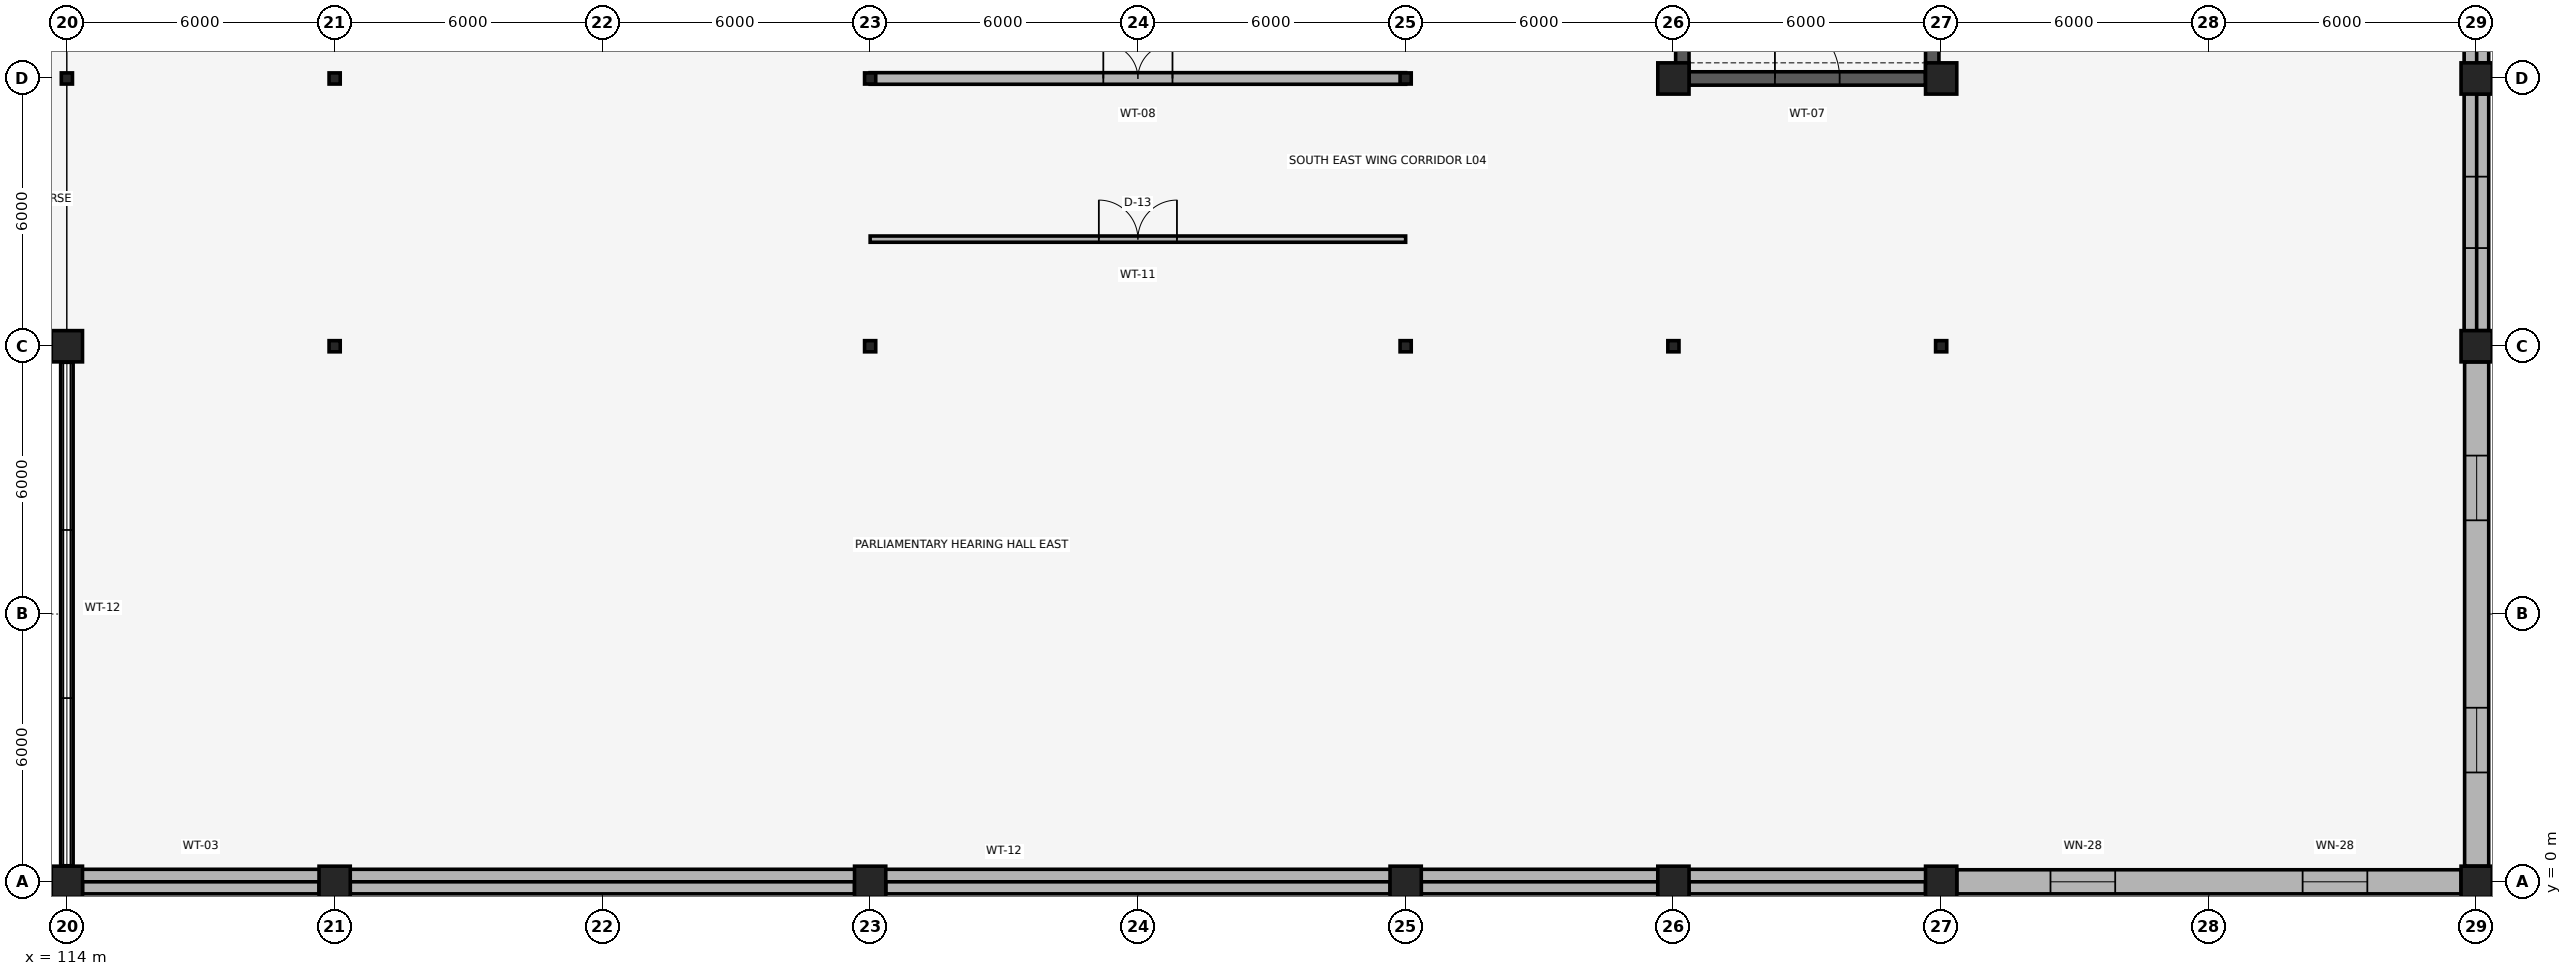
"""IFC4 building model, lengths in metres.
Left out: names, types, materials, properties, quantities, classifications, styles, units other than length and angle.
Written with IfcOpenShell. Run it as: python <this file> out.ifc"""

import sys

from ifc_helpers import new_model, si_unit, direction, frame, frame_2d, origin, origin_2d, place, context, subcontext, project, spatial, rectangle, i_section, extrude, element, fill, save


model = new_model("IFC4")
c1 = context("Model", 3, precision=1e-05, world=origin(), true_north=direction((0.0, 1.0)))
c2 = subcontext(c1, "Body", "Model", "MODEL_VIEW")
j1 = project(units=[si_unit("LENGTHUNIT", "METRE"), si_unit("PLANEANGLEUNIT", "RADIAN")], contexts=[c1])
p1 = place(None, origin())
s1 = spatial("IfcSite", under=j1, at=p1, CompositionType="ELEMENT")
p2 = place(p1, origin())
s2 = spatial("IfcBuilding", under=s1, at=p2, CompositionType="ELEMENT")
p3 = place(p2, frame((0.0, 0.0, 16.5)))
s3 = spatial("IfcBuildingStorey", under=s2, at=p3, CompositionType="ELEMENT", Elevation=16.5)
for number, where, z_axis, x_axis in (
    (1, (114.0, 0.0, 0.0), (0.0, 0.0, 1.0), (1.0, 0.0, 0.0)),
    (2, (120.0, 0.0, 0.0), (0.0, 0.0, 1.0), (1.0, 0.0, 0.0)),
    (3, (132.0, 0.0, 0.0), (0.0, 0.0, 1.0), (1.0, 0.0, 0.0)),
    (4, (144.0, 0.0, 0.0), (0.0, 0.0, 1.0), (1.0, 0.0, 0.0)),
    (5, (150.0, 0.0, 0.0), (0.0, 0.0, 1.0), (1.0, 0.0, 0.0)),
    (6, (156.0, 0.0, 0.0), (0.0, 0.0, 1.0), (1.0, 0.0, 0.0)),
    (7, (168.0, 0.0, 0.0), (0.0, 0.0, 1.0), (1.0, 0.0, 0.0)),
    (8, (114.0, 12.0, 0.0), (0.0, 0.0, 1.0), (1.0, 0.0, 0.0)),
):
    element("IfcColumn", number, at=place(p3, frame(where, z_axis=z_axis, x_axis=x_axis)), inside=s3, PredefinedType="COLUMN", context=c2, shape_type="SweptSolid", body=[
        extrude(rectangle(XDim=0.7, YDim=0.7, at=origin_2d()), origin(), (0.0, 0.0, 1.0), 4.0),
    ])
for number, where, z_axis, x_axis in (
    (9, (120.0, 12.0, 0.0), (0.0, 0.0, 1.0), (1.0, 0.0, 0.0)),
    (10, (132.0, 12.0, 0.0), (0.0, 0.0, 1.0), (1.0, 0.0, 0.0)),
    (11, (144.0, 12.0, 0.0), (0.0, 0.0, 1.0), (1.0, 0.0, 0.0)),
    (12, (150.0, 12.0, 0.0), (0.0, 0.0, 1.0), (1.0, 0.0, 0.0)),
    (13, (156.0, 12.0, 0.0), (0.0, 0.0, 1.0), (1.0, 0.0, 0.0)),
):
    element("IfcColumn", number, at=place(p3, frame(where, z_axis=z_axis, x_axis=x_axis)), inside=s3, PredefinedType="COLUMN", context=c2, shape_type="SweptSolid", body=[
        extrude(i_section(OverallWidth=0.25, OverallDepth=0.25, WebThickness=0.009, FlangeThickness=0.014, FilletRadius=0.016, at=origin_2d()), origin(), (0.0, 0.0, 1.0), 4.0),
    ])
p4 = place(p3, frame((168.0, 12.0, 0.0), z_axis=(0.0, 0.0, 1.0), x_axis=(1.0, 0.0, 0.0)))
e14 = element("IfcColumn", 14, at=p4, inside=s3, PredefinedType="COLUMN", context=c2, shape_type="SweptSolid", body=[
    extrude(rectangle(XDim=0.7, YDim=0.7, at=origin_2d()), origin(), (0.0, 0.0, 1.0), 4.0),
])
for number, where, z_axis, x_axis in (
    (15, (114.0, 18.0, 0.0), (0.0, 0.0, 1.0), (1.0, 0.0, 0.0)),
    (16, (120.0, 18.0, 0.0), (0.0, 0.0, 1.0), (1.0, 0.0, 0.0)),
    (17, (132.0, 18.0, 0.0), (0.0, 0.0, 1.0), (1.0, 0.0, 0.0)),
    (18, (144.0, 18.0, 0.0), (0.0, 0.0, 1.0), (1.0, 0.0, 0.0)),
):
    element("IfcColumn", number, at=place(p3, frame(where, z_axis=z_axis, x_axis=x_axis)), inside=s3, PredefinedType="COLUMN", context=c2, shape_type="SweptSolid", body=[
        extrude(i_section(OverallWidth=0.25, OverallDepth=0.25, WebThickness=0.009, FlangeThickness=0.014, FilletRadius=0.016, at=origin_2d()), origin(), (0.0, 0.0, 1.0), 4.0),
    ])
for number, where, z_axis, x_axis in (
    (19, (150.0, 18.0, 0.0), (0.0, 0.0, 1.0), (1.0, 0.0, 0.0)),
    (20, (156.0, 18.0, 0.0), (0.0, 0.0, 1.0), (1.0, 0.0, 0.0)),
    (21, (168.0, 18.0, 0.0), (0.0, 0.0, 1.0), (1.0, 0.0, 0.0)),
):
    element("IfcColumn", number, at=place(p3, frame(where, z_axis=z_axis, x_axis=x_axis)), inside=s3, PredefinedType="COLUMN", context=c2, shape_type="SweptSolid", body=[
        extrude(rectangle(XDim=0.7, YDim=0.7, at=origin_2d()), origin(), (0.0, 0.0, 1.0), 4.0),
    ])
p5 = place(p3, frame((114.35, 0.0, 0.0), z_axis=(0.0, 0.0, 1.0), x_axis=(1.0, 0.0, 0.0)))
e22 = element("IfcWall", 22, at=p5, inside=s3, PredefinedType="SOLIDWALL", context=c2, shape_type="SweptSolid", body=[
    extrude(rectangle(XDim=5.3, YDim=0.54, at=frame_2d((2.65, 0.0))), origin(), (0.0, 0.0, 1.0), 3.55),
])
for number, where, z_axis, x_axis in (
    (23, (120.35, 0.0, 0.0), (0.0, 0.0, 1.0), (1.0, 0.0, 0.0)),
    (24, (132.35, 0.0, 0.0), (0.0, 0.0, 1.0), (1.0, 0.0, 0.0)),
):
    element("IfcWall", number, at=place(p3, frame(where, z_axis=z_axis, x_axis=x_axis)), inside=s3, PredefinedType="SOLIDWALL", context=c2, shape_type="SweptSolid", body=[
        extrude(rectangle(XDim=11.3, YDim=0.54, at=frame_2d((5.65, 0.0))), origin(), (0.0, 0.0, 1.0), 3.55),
    ])
for number, where, z_axis, x_axis in (
    (25, (144.35, 0.0, 0.0), (0.0, 0.0, 1.0), (1.0, 0.0, 0.0)),
    (26, (150.35, 0.0, 0.0), (0.0, 0.0, 1.0), (1.0, 0.0, 0.0)),
):
    element("IfcWall", number, at=place(p3, frame(where, z_axis=z_axis, x_axis=x_axis)), inside=s3, PredefinedType="SOLIDWALL", context=c2, shape_type="SweptSolid", body=[
        extrude(rectangle(XDim=5.3, YDim=0.54, at=frame_2d((2.65, 0.0))), origin(), (0.0, 0.0, 1.0), 3.55),
    ])
p6 = place(p3, frame((156.35, 0.0, 0.0), z_axis=(0.0, 0.0, 1.0), x_axis=(1.0, 0.0, 0.0)))
e27 = element("IfcWall", 27, at=p6, inside=s3, PredefinedType="SOLIDWALL", context=c2, shape_type="SweptSolid", body=[
    extrude(rectangle(XDim=11.3, YDim=0.54, at=frame_2d((5.65, 0.0))), origin(), (0.0, 0.0, 1.0), 3.55),
])
p7 = place(p6, frame((2.1, 0.0, 0.85)))
e28 = element("IfcOpeningElement", 28, at=p7, cuts=e27, PredefinedType="OPENING", context=c2, shape_type="SweptSolid", body=[
    extrude(rectangle(XDim=1.45, YDim=2.15, at=frame_2d((0.725, 1.075))), frame((0.0, 0.285, 0.0), z_axis=(0.0, -1.0, 0.0), x_axis=(1.0, 0.0, 0.0)), (0.0, 0.0, 1.0), 0.57),
])
p8 = place(p6, frame((7.75, 0.0, 0.85)))
e29 = element("IfcOpeningElement", 29, at=p8, cuts=e27, PredefinedType="OPENING", context=c2, shape_type="SweptSolid", body=[
    extrude(rectangle(XDim=1.45, YDim=2.15, at=frame_2d((0.725, 1.075))), frame((0.0, 0.285, 0.0), z_axis=(0.0, -1.0, 0.0), x_axis=(1.0, 0.0, 0.0)), (0.0, 0.0, 1.0), 0.57),
])
p9 = place(p3, frame((168.0, 0.35, 0.0), z_axis=(0.0, 0.0, 1.0), x_axis=(0.0, 1.0, 0.0)))
e30 = element("IfcWall", 30, at=p9, inside=s3, PredefinedType="SOLIDWALL", context=c2, shape_type="SweptSolid", body=[
    extrude(rectangle(XDim=11.3, YDim=0.54, at=frame_2d((5.65, 0.0))), origin(), (0.0, 0.0, 1.0), 3.55),
])
p10 = place(p9, frame((2.1, 0.0, 0.85)))
e31 = element("IfcOpeningElement", 31, at=p10, cuts=e30, PredefinedType="OPENING", context=c2, shape_type="SweptSolid", body=[
    extrude(rectangle(XDim=1.45, YDim=2.15, at=frame_2d((0.725, 1.075))), frame((0.0, 0.285, 0.0), z_axis=(0.0, -1.0, 0.0), x_axis=(1.0, 0.0, 0.0)), (0.0, 0.0, 1.0), 0.57),
])
p11 = place(p9, frame((7.75, 0.0, 0.85)))
e32 = element("IfcOpeningElement", 32, at=p11, cuts=e30, PredefinedType="OPENING", context=c2, shape_type="SweptSolid", body=[
    extrude(rectangle(XDim=1.45, YDim=2.15, at=frame_2d((0.725, 1.075))), frame((0.0, 0.285, 0.0), z_axis=(0.0, -1.0, 0.0), x_axis=(1.0, 0.0, 0.0)), (0.0, 0.0, 1.0), 0.57),
])
p12 = place(p3, frame((168.0, 12.35, 0.0), z_axis=(0.0, 0.0, 1.0), x_axis=(0.0, 1.0, 0.0)))
e33 = element("IfcWall", 33, at=p12, inside=s3, PredefinedType="SOLIDWALL", context=c2, shape_type="SweptSolid", body=[
    extrude(rectangle(XDim=5.3, YDim=0.54, at=frame_2d((2.65, 0.0))), origin(), (0.0, 0.0, 1.0), 3.55),
])
p13 = place(p12, frame((1.85, 0.0, 0.85)))
e34 = element("IfcOpeningElement", 34, at=p13, cuts=e33, PredefinedType="OPENING", context=c2, shape_type="SweptSolid", body=[
    extrude(rectangle(XDim=1.6, YDim=2.2, at=frame_2d((0.8, 1.1))), frame((0.0, 0.285, 0.0), z_axis=(0.0, -1.0, 0.0), x_axis=(1.0, 0.0, 0.0)), (0.0, 0.0, 1.0), 0.57),
])
p14 = place(p3, frame((168.0, 18.35, 0.0), z_axis=(0.0, 0.0, 1.0), x_axis=(0.0, 1.0, 0.0)))
e35 = element("IfcWall", 35, at=p14, inside=s3, PredefinedType="SOLIDWALL", context=c2, shape_type="SweptSolid", body=[
    extrude(rectangle(XDim=11.3, YDim=0.54, at=frame_2d((5.65, 0.0))), origin(), (0.0, 0.0, 1.0), 3.55),
])
p15 = place(p14, frame((2.025, 0.0, 0.85)))
e36 = element("IfcOpeningElement", 36, at=p15, cuts=e35, PredefinedType="OPENING", context=c2, shape_type="SweptSolid", body=[
    extrude(rectangle(XDim=1.6, YDim=2.2, at=frame_2d((0.8, 1.1))), frame((0.0, 0.285, 0.0), z_axis=(0.0, -1.0, 0.0), x_axis=(1.0, 0.0, 0.0)), (0.0, 0.0, 1.0), 0.57),
])
p16 = place(p14, frame((7.675, 0.0, 0.85)))
e37 = element("IfcOpeningElement", 37, at=p16, cuts=e35, PredefinedType="OPENING", context=c2, shape_type="SweptSolid", body=[
    extrude(rectangle(XDim=1.6, YDim=2.2, at=frame_2d((0.8, 1.1))), frame((0.0, 0.285, 0.0), z_axis=(0.0, -1.0, 0.0), x_axis=(1.0, 0.0, 0.0)), (0.0, 0.0, 1.0), 0.57),
])
p17 = place(p3, frame((54.0, 12.14, 4.2), z_axis=(0.0, 0.0, 1.0), x_axis=(1.0, 0.0, 0.0)))
e38 = element("IfcWall", 38, at=p17, inside=s3, PredefinedType="PARAPET", context=c2, shape_type="SweptSolid", body=[
    extrude(rectangle(XDim=60.0, YDim=0.28, at=frame_2d((30.0, 0.0))), origin(), (0.0, 0.0, 1.0), 0.85),
])
p18 = place(p3, frame((114.0, 0.0, 4.2), z_axis=(0.0, 0.0, 1.0), x_axis=(0.0, 1.0, 0.0)))
e39 = element("IfcWall", 39, at=p18, inside=s3, PredefinedType="PARAPET", context=c2, shape_type="SweptSolid", body=[
    extrude(rectangle(XDim=12.28, YDim=0.28, at=frame_2d((6.14, 0.0))), origin(), (0.0, 0.0, 1.0), 0.85),
])
p19 = place(p3, frame((114.0, 0.14, 4.2), z_axis=(0.0, 0.0, 1.0), x_axis=(1.0, 0.0, 0.0)))
e40 = element("IfcWall", 40, at=p19, inside=s3, PredefinedType="PARAPET", context=c2, shape_type="SweptSolid", body=[
    extrude(rectangle(XDim=42.0, YDim=0.28, at=frame_2d((21.0, 0.0))), origin(), (0.0, 0.0, 1.0), 0.85),
])
p20 = place(p3, frame((167.86, 12.0, 4.2), z_axis=(0.0, 0.0, 1.0), x_axis=(0.0, 1.0, 0.0)))
e41 = element("IfcWall", 41, at=p20, inside=s3, PredefinedType="PARAPET", context=c2, shape_type="SweptSolid", body=[
    extrude(rectangle(XDim=90.0, YDim=0.28, at=frame_2d((45.0, 0.0))), origin(), (0.0, 0.0, 1.0), 0.85),
])
p21 = place(p3, frame((150.35, 18.0, 0.0), z_axis=(0.0, 0.0, 1.0), x_axis=(1.0, 0.0, 0.0)))
e42 = element("IfcWall", 42, at=p21, inside=s3, PredefinedType="SHEAR", context=c2, shape_type="SweptSolid", body=[
    extrude(rectangle(XDim=5.3, YDim=0.3, at=frame_2d((2.65, 0.0))), origin(), (0.0, 0.0, 1.0), 4.0),
])
p22 = place(p21, frame((1.925, 0.0, 0.0)))
e43 = element("IfcOpeningElement", 43, at=p22, cuts=e42, PredefinedType="OPENING", context=c2, shape_type="SweptSolid", body=[
    extrude(rectangle(XDim=1.45, YDim=2.25, at=frame_2d((0.725, 1.125))), frame((0.0, 0.165, 0.0), z_axis=(0.0, -1.0, 0.0), x_axis=(1.0, 0.0, 0.0)), (0.0, 0.0, 1.0), 0.33),
])
for number, where, z_axis, x_axis in (
    (44, (150.2, 18.0, 0.0), (0.0, 0.0, 1.0), (0.0, 1.0, 0.0)),
    (45, (155.8, 18.0, 0.0), (0.0, 0.0, 1.0), (0.0, 1.0, 0.0)),
):
    element("IfcWall", number, at=place(p3, frame(where, z_axis=z_axis, x_axis=x_axis)), inside=s3, PredefinedType="SHEAR", context=c2, shape_type="SweptSolid", body=[
        extrude(rectangle(XDim=11.8, YDim=0.3, at=frame_2d((5.9, 0.0))), origin(), (0.0, 0.0, 1.0), 4.0),
    ])
p23 = place(p3, frame((132.0, 14.4, 0.0), z_axis=(0.0, 0.0, 1.0), x_axis=(1.0, 0.0, 0.0)))
e46 = element("IfcWall", 46, at=p23, inside=s3, PredefinedType="PARTITIONING", context=c2, shape_type="SweptSolid", body=[
    extrude(rectangle(XDim=12.0, YDim=0.14, at=frame_2d((6.0, 0.0))), origin(), (0.0, 0.0, 1.0), 4.0),
])
p24 = place(p23, frame((5.125, 0.0, 0.0)))
e47 = element("IfcOpeningElement", 47, at=p24, cuts=e46, PredefinedType="OPENING", context=c2, shape_type="SweptSolid", body=[
    extrude(rectangle(XDim=1.75, YDim=2.55, at=frame_2d((0.875, 1.275))), frame((0.0, 0.085, 0.0), z_axis=(0.0, -1.0, 0.0), x_axis=(1.0, 0.0, 0.0)), (0.0, 0.0, 1.0), 0.17),
])
p25 = place(p3, frame((132.0, 18.0, 0.0), z_axis=(0.0, 0.0, 1.0), x_axis=(1.0, 0.0, 0.0)))
e48 = element("IfcWall", 48, at=p25, inside=s3, PredefinedType="PARTITIONING", context=c2, shape_type="SweptSolid", body=[
    extrude(rectangle(XDim=12.0, YDim=0.26, at=frame_2d((6.0, 0.0))), origin(), (0.0, 0.0, 1.0), 3.513),
])
p26 = place(p25, frame((5.225, 0.0, 0.0)))
e49 = element("IfcOpeningElement", 49, at=p26, cuts=e48, PredefinedType="OPENING", context=c2, shape_type="SweptSolid", body=[
    extrude(rectangle(XDim=1.55, YDim=2.3, at=frame_2d((0.775, 1.15))), frame((0.0, 0.145, 0.0), z_axis=(0.0, -1.0, 0.0), x_axis=(1.0, 0.0, 0.0)), (0.0, 0.0, 1.0), 0.29),
])
p27 = place(p7, origin())
e50 = element("IfcWindow", 50, at=p27, inside=s3, PartitioningType="SINGLE_PANEL", PredefinedType="WINDOW", context=c2, shape_type="SweptSolid", body=[
    extrude(rectangle(XDim=1.45, YDim=2.15, at=frame_2d((0.725, 1.075))), frame((0.0, 0.03, 0.0), z_axis=(0.0, -1.0, 0.0), x_axis=(1.0, 0.0, 0.0)), (0.0, 0.0, 1.0), 0.06),
])
fill(e28, e50)
p28 = place(p8, origin())
e51 = element("IfcWindow", 51, at=p28, inside=s3, PartitioningType="SINGLE_PANEL", PredefinedType="WINDOW", context=c2, shape_type="SweptSolid", body=[
    extrude(rectangle(XDim=1.45, YDim=2.15, at=frame_2d((0.725, 1.075))), frame((0.0, 0.03, 0.0), z_axis=(0.0, -1.0, 0.0), x_axis=(1.0, 0.0, 0.0)), (0.0, 0.0, 1.0), 0.06),
])
fill(e29, e51)
p29 = place(p10, origin())
e52 = element("IfcWindow", 52, at=p29, inside=s3, PartitioningType="SINGLE_PANEL", PredefinedType="WINDOW", context=c2, shape_type="SweptSolid", body=[
    extrude(rectangle(XDim=1.45, YDim=2.15, at=frame_2d((0.725, 1.075))), frame((0.0, 0.03, 0.0), z_axis=(0.0, -1.0, 0.0), x_axis=(1.0, 0.0, 0.0)), (0.0, 0.0, 1.0), 0.06),
])
fill(e31, e52)
p30 = place(p11, origin())
e53 = element("IfcWindow", 53, at=p30, inside=s3, PartitioningType="SINGLE_PANEL", PredefinedType="WINDOW", context=c2, shape_type="SweptSolid", body=[
    extrude(rectangle(XDim=1.45, YDim=2.15, at=frame_2d((0.725, 1.075))), frame((0.0, 0.03, 0.0), z_axis=(0.0, -1.0, 0.0), x_axis=(1.0, 0.0, 0.0)), (0.0, 0.0, 1.0), 0.06),
])
fill(e32, e53)
p31 = place(p13, origin())
e54 = element("IfcWindow", 54, at=p31, inside=s3, PartitioningType="SINGLE_PANEL", PredefinedType="WINDOW", context=c2, shape_type="SweptSolid", body=[
    extrude(rectangle(XDim=1.6, YDim=2.2, at=frame_2d((0.8, 1.1))), frame((0.0, 0.03, 0.0), z_axis=(0.0, -1.0, 0.0), x_axis=(1.0, 0.0, 0.0)), (0.0, 0.0, 1.0), 0.06),
])
fill(e34, e54)
p32 = place(p22, origin())
e55 = element("IfcDoor", 55, at=p32, inside=s3, OperationType="SINGLE_SWING_LEFT", PredefinedType="DOOR", context=c2, shape_type="SweptSolid", body=[
    extrude(rectangle(XDim=1.45, YDim=2.25, at=frame_2d((0.725, 1.125))), frame((0.0, 0.025, 0.0), z_axis=(0.0, -1.0, 0.0), x_axis=(1.0, 0.0, 0.0)), (0.0, 0.0, 1.0), 0.05),
])
fill(e43, e55)
p33 = place(p24, origin())
e56 = element("IfcDoor", 56, at=p33, inside=s3, OperationType="DOUBLE_DOOR_SINGLE_SWING", PredefinedType="DOOR", context=c2, shape_type="SweptSolid", body=[
    extrude(rectangle(XDim=1.75, YDim=2.55, at=frame_2d((0.875, 1.275))), frame((0.0, 0.025, 0.0), z_axis=(0.0, -1.0, 0.0), x_axis=(1.0, 0.0, 0.0)), (0.0, 0.0, 1.0), 0.05),
])
fill(e47, e56)
p34 = place(p26, origin())
e57 = element("IfcDoor", 57, at=p34, inside=s3, OperationType="DOUBLE_DOOR_SINGLE_SWING", PredefinedType="DOOR", context=c2, shape_type="SweptSolid", body=[
    extrude(rectangle(XDim=1.55, YDim=2.3, at=frame_2d((0.775, 1.15))), frame((0.0, 0.025, 0.0), z_axis=(0.0, -1.0, 0.0), x_axis=(1.0, 0.0, 0.0)), (0.0, 0.0, 1.0), 0.05),
])
fill(e49, e57)
save(model, sys.argv[1])
